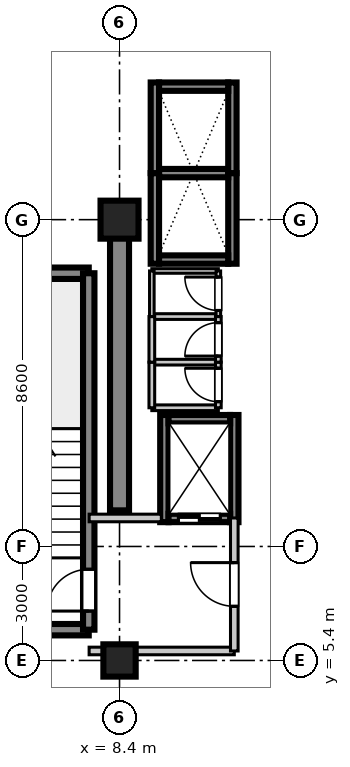
"""IFC4 building model, lengths in metres.
Left out: names, types, materials, properties, quantities, classifications, styles, units other than length and angle.
Written with IfcOpenShell. Run it as: python <this file> out.ifc"""

import sys

from ifc_helpers import new_model, si_unit, direction, frame, frame_2d, origin, origin_2d, place, context, subcontext, project, spatial, rectangle, extrude, source, transform, mapped, element, fill, save


model = new_model("IFC4")
c1 = context("Model", 3, precision=1e-05, world=origin(), true_north=direction((0.0, 1.0)))
c2 = subcontext(c1, "Body", "Model", "MODEL_VIEW")
j1 = project(units=[si_unit("LENGTHUNIT", "METRE"), si_unit("PLANEANGLEUNIT", "RADIAN")], contexts=[c1])
p1 = place(None, origin())
s1 = spatial("IfcSite", under=j1, at=p1, CompositionType="ELEMENT")
p2 = place(p1, origin())
s2 = spatial("IfcBuilding", under=s1, at=p2, CompositionType="ELEMENT")
p3 = place(p2, frame((0.0, 0.0, 234.5)))
s3 = spatial("IfcBuildingStorey", under=s2, at=p3, CompositionType="ELEMENT", Elevation=234.5)
m1 = source(origin(), c2, "Body", "SweptSolid", [
    extrude(rectangle(XDim=0.85, YDim=0.85, at=origin_2d()), origin(), (0.0, 0.0, 1.0), 3.655),
])
p4 = place(p3, frame((8.4, 5.4, 0.0), z_axis=(0.0, 0.0, 1.0), x_axis=(1.0, 0.0, 0.0)))
e1 = element("IfcColumn", 1, at=p4, inside=s3, PredefinedType="PILASTER", context=c2, shape_type="MappedRepresentation", body=[
    mapped(m1, transform((0.0, 0.0, 0.0), scale=1.0)),
])
m2 = source(origin(), c2, "Body", "SweptSolid", [
    extrude(rectangle(XDim=1.0, YDim=1.0, at=origin_2d()), origin(), (0.0, 0.0, 1.0), 3.655),
])
p5 = place(p3, frame((8.4, 17.0, 0.0), z_axis=(0.0, 0.0, 1.0), x_axis=(1.0, 0.0, 0.0)))
e2 = element("IfcColumn", 2, at=p5, inside=s3, PredefinedType="COLUMN", context=c2, shape_type="MappedRepresentation", body=[
    mapped(m2, transform((0.0, 0.0, 0.0), scale=1.0)),
])
m3 = source(origin(), c2, "Body", "SweptSolid", [
    extrude(rectangle(XDim=7.65, YDim=0.5, at=frame_2d((3.825, 0.0))), origin(), (0.0, 0.0, 1.0), 3.41),
])
p6 = place(p3, frame((8.4, 9.35, 0.0), z_axis=(0.0, 0.0, 1.0), x_axis=(0.0, 1.0, 0.0)))
e3 = element("IfcWall", 3, at=p6, inside=s3, PredefinedType="SHEAR", context=c2, shape_type="MappedRepresentation", body=[
    mapped(m3, transform((0.0, 0.0, 0.0), scale=1.0)),
])
m4 = source(origin(), c2, "Body", "SweptSolid", [
    extrude(rectangle(XDim=3.98, YDim=0.3, at=frame_2d((1.99, 0.0))), origin(), (0.0, 0.0, 1.0), 3.41),
])
for number, where, z_axis, x_axis in (
    (4, (3.61, 6.21, 0.0), (0.0, 0.0, 1.0), (1.0, 0.0, 0.0)),
    (5, (3.61, 15.59, 0.0), (0.0, 0.0, 1.0), (1.0, 0.0, 0.0)),
):
    element("IfcWall", number, at=place(p3, frame(where, z_axis=z_axis, x_axis=x_axis)), inside=s3, PredefinedType="SHEAR", context=c2, shape_type="MappedRepresentation", body=[
        mapped(m4, transform((0.0, 0.0, 0.0), scale=1.0)),
    ])
m5 = source(origin(), c2, "Body", "SweptSolid", [
    extrude(rectangle(XDim=9.38, YDim=0.3, at=frame_2d((4.69, 0.0))), origin(), (0.0, 0.0, 1.0), 3.41),
])
p7 = place(p3, frame((7.59, 6.21, 0.0), z_axis=(0.0, 0.0, 1.0), x_axis=(0.0, 1.0, 0.0)))
e6 = element("IfcWall", 6, at=p7, inside=s3, PredefinedType="SHEAR", context=c2, shape_type="MappedRepresentation", body=[
    mapped(m5, transform((0.0, 0.0, 0.0), scale=1.0)),
])
p8 = place(p7, frame((0.49, 0.0, 0.0)))
e7 = element("IfcOpeningElement", 7, at=p8, cuts=e6, PredefinedType="OPENING", context=c2, shape_type="SweptSolid", body=[
    extrude(rectangle(XDim=1.1, YDim=2.15, at=frame_2d((0.55, 1.075))), frame((0.0, 0.16, 0.0), z_axis=(0.0, -1.0, 0.0), x_axis=(1.0, 0.0, 0.0)), (0.0, 0.0, 1.0), 0.32),
])
m6 = source(origin(), c2, "Body", "SweptSolid", [
    extrude(rectangle(XDim=2.385, YDim=0.22, at=frame_2d((1.192, 0.0))), origin(), (0.0, 0.0, 1.0), 3.41),
])
for number, where, z_axis, x_axis in (
    (8, (9.33, 15.84, 0.0), (0.0, 0.0, 1.0), (0.0, 1.0, 0.0)),
    (9, (11.37, 15.84, 0.0), (0.0, 0.0, 1.0), (0.0, 1.0, 0.0)),
):
    element("IfcWall", number, at=place(p3, frame(where, z_axis=z_axis, x_axis=x_axis)), inside=s3, PredefinedType="SHEAR", context=c2, shape_type="MappedRepresentation", body=[
        mapped(m6, transform((0.0, 0.0, 0.0), scale=1.0)),
    ])
m7 = source(origin(), c2, "Body", "SweptSolid", [
    extrude(rectangle(XDim=1.82, YDim=0.22, at=frame_2d((0.91, 0.0))), origin(), (0.0, 0.0, 1.0), 3.41),
])
p9 = place(p3, frame((9.44, 15.95, 0.0), z_axis=(0.0, 0.0, 1.0), x_axis=(1.0, 0.0, 0.0)))
e10 = element("IfcWall", 10, at=p9, inside=s3, PredefinedType="SHEAR", context=c2, shape_type="MappedRepresentation", body=[
    mapped(m7, transform((0.0, 0.0, 0.0), scale=1.0)),
])
m8 = source(origin(), c2, "Body", "SweptSolid", [
    extrude(rectangle(XDim=1.82, YDim=0.22, at=frame_2d((0.91, 0.0))), origin(), (0.0, 0.0, 1.0), 3.7),
])
p10 = place(p3, frame((9.44, 18.225, 0.0), z_axis=(0.0, 0.0, 1.0), x_axis=(1.0, 0.0, 0.0)))
e11 = element("IfcWall", 11, at=p10, inside=s3, PredefinedType="SHEAR", context=c2, shape_type="MappedRepresentation", body=[
    mapped(m8, transform((0.0, 0.0, 0.0), scale=1.0)),
])
for number, where, z_axis, x_axis in (
    (12, (9.33, 18.225, 0.0), (0.0, 0.0, 1.0), (0.0, 1.0, 0.0)),
    (13, (11.37, 18.225, 0.0), (0.0, 0.0, 1.0), (0.0, 1.0, 0.0)),
):
    element("IfcWall", number, at=place(p3, frame(where, z_axis=z_axis, x_axis=x_axis)), inside=s3, PredefinedType="SHEAR", context=c2, shape_type="MappedRepresentation", body=[
        mapped(m6, transform((0.0, 0.0, 0.0), scale=1.0)),
    ])
p11 = place(p3, frame((9.44, 20.5, 0.0), z_axis=(0.0, 0.0, 1.0), x_axis=(1.0, 0.0, 0.0)))
e14 = element("IfcWall", 14, at=p11, inside=s3, PredefinedType="SHEAR", context=c2, shape_type="MappedRepresentation", body=[
    mapped(m7, transform((0.0, 0.0, 0.0), scale=1.0)),
])
m9 = source(origin(), c2, "Body", "SweptSolid", [
    extrude(rectangle(XDim=2.82, YDim=0.22, at=frame_2d((1.41, 0.0))), origin(), (0.0, 0.0, 1.0), 3.41),
])
for number, where, z_axis, x_axis in (
    (15, (9.58, 9.04, 0.0), (0.0, 0.0, 1.0), (0.0, 1.0, 0.0)),
    (16, (11.42, 9.04, 0.0), (0.0, 0.0, 1.0), (0.0, 1.0, 0.0)),
):
    element("IfcWall", number, at=place(p3, frame(where, z_axis=z_axis, x_axis=x_axis)), inside=s3, PredefinedType="SHEAR", context=c2, shape_type="MappedRepresentation", body=[
        mapped(m9, transform((0.0, 0.0, 0.0), scale=1.0)),
    ])
m10 = source(origin(), c2, "Body", "SweptSolid", [
    extrude(rectangle(XDim=1.62, YDim=0.22, at=frame_2d((0.81, 0.0))), origin(), (0.0, 0.0, 1.0), 3.41),
])
p12 = place(p3, frame((9.69, 9.15, 0.0), z_axis=(0.0, 0.0, 1.0), x_axis=(1.0, 0.0, 0.0)))
e17 = element("IfcWall", 17, at=p12, inside=s3, PredefinedType="SHEAR", context=c2, shape_type="MappedRepresentation", body=[
    mapped(m10, transform((0.0, 0.0, 0.0), scale=1.0)),
])
p13 = place(p12, frame((0.26, 0.0, 0.0)))
e18 = element("IfcOpeningElement", 18, at=p13, cuts=e17, PredefinedType="OPENING", context=c2, shape_type="SweptSolid", body=[
    extrude(rectangle(XDim=1.1, YDim=2.2, at=frame_2d((0.55, 1.1))), frame((0.0, 0.12, 0.0), z_axis=(0.0, -1.0, 0.0), x_axis=(1.0, 0.0, 0.0)), (0.0, 0.0, 1.0), 0.24),
])
p14 = place(p3, frame((9.69, 11.75, 0.0), z_axis=(0.0, 0.0, 1.0), x_axis=(1.0, 0.0, 0.0)))
e19 = element("IfcWall", 19, at=p14, inside=s3, PredefinedType="SHEAR", context=c2, shape_type="MappedRepresentation", body=[
    mapped(m10, transform((0.0, 0.0, 0.0), scale=1.0)),
])
m11 = source(origin(), c2, "Body", "SweptSolid", [
    extrude(rectangle(XDim=3.82, YDim=0.2, at=frame_2d((1.91, 0.0))), origin(), (0.0, 0.0, 1.0), 2.75),
])
p15 = place(p3, frame((7.6, 5.65, 0.0), z_axis=(0.0, 0.0, 1.0), x_axis=(1.0, 0.0, 0.0)))
e20 = element("IfcWall", 20, at=p15, inside=s3, PredefinedType="PARTITIONING", context=c2, shape_type="MappedRepresentation", body=[
    mapped(m11, transform((0.0, 0.0, 0.0), scale=1.0)),
])
m12 = source(origin(), c2, "Body", "SweptSolid", [
    extrude(rectangle(XDim=1.9, YDim=0.2, at=frame_2d((0.95, 0.0))), origin(), (0.0, 0.0, 1.0), 2.75),
])
p16 = place(p3, frame((7.6, 9.15, 0.0), z_axis=(0.0, 0.0, 1.0), x_axis=(1.0, 0.0, 0.0)))
e21 = element("IfcWall", 21, at=p16, inside=s3, PredefinedType="PARTITIONING", context=c2, shape_type="MappedRepresentation", body=[
    mapped(m12, transform((0.0, 0.0, 0.0), scale=1.0)),
])
m13 = source(origin(), c2, "Body", "SweptSolid", [
    extrude(rectangle(XDim=3.5, YDim=0.2, at=frame_2d((1.75, 0.0))), origin(), (0.0, 0.0, 1.0), 2.75),
])
p17 = place(p3, frame((11.42, 5.65, 0.0), z_axis=(0.0, 0.0, 1.0), x_axis=(0.0, 1.0, 0.0)))
e22 = element("IfcWall", 22, at=p17, inside=s3, PredefinedType="PARTITIONING", context=c2, shape_type="MappedRepresentation", body=[
    mapped(m13, transform((0.0, 0.0, 0.0), scale=1.0)),
])
p18 = place(p17, frame((1.175, 0.0, 0.0)))
e23 = element("IfcOpeningElement", 23, at=p18, cuts=e22, PredefinedType="OPENING", context=c2, shape_type="SweptSolid", body=[
    extrude(rectangle(XDim=1.15, YDim=2.15, at=frame_2d((0.575, 1.075))), frame((0.0, 0.11, 0.0), z_axis=(0.0, -1.0, 0.0), x_axis=(1.0, 0.0, 0.0)), (0.0, 0.0, 1.0), 0.22),
])
m14 = source(origin(), c2, "Body", "SweptSolid", [
    extrude(rectangle(XDim=1.75, YDim=0.15, at=frame_2d((0.875, 0.0))), origin(), (0.0, 0.0, 1.0), 2.75),
])
for number, where, z_axis, x_axis in (
    (24, (9.25, 12.05, 0.0), (0.0, 0.0, 1.0), (1.0, 0.0, 0.0)),
    (25, (9.25, 13.25, 0.0), (0.0, 0.0, 1.0), (1.0, 0.0, 0.0)),
):
    element("IfcWall", number, at=place(p3, frame(where, z_axis=z_axis, x_axis=x_axis)), inside=s3, PredefinedType="PARTITIONING", context=c2, shape_type="MappedRepresentation", body=[
        mapped(m14, transform((0.0, 0.0, 0.0), scale=1.0)),
    ])
m15 = source(origin(), c2, "Body", "SweptSolid", [
    extrude(rectangle(XDim=1.2, YDim=0.15, at=frame_2d((0.6, 0.0))), origin(), (0.0, 0.0, 1.0), 2.75),
])
p19 = place(p3, frame((9.25, 12.05, 0.0), z_axis=(0.0, 0.0, 1.0), x_axis=(0.0, 1.0, 0.0)))
e26 = element("IfcWall", 26, at=p19, inside=s3, PredefinedType="PARTITIONING", context=c2, shape_type="MappedRepresentation", body=[
    mapped(m15, transform((0.0, 0.0, 0.0), scale=1.0)),
])
p20 = place(p3, frame((11.0, 12.05, 0.0), z_axis=(0.0, 0.0, 1.0), x_axis=(0.0, 1.0, 0.0)))
e27 = element("IfcWall", 27, at=p20, inside=s3, PredefinedType="PARTITIONING", context=c2, shape_type="MappedRepresentation", body=[
    mapped(m15, transform((0.0, 0.0, 0.0), scale=1.0)),
])
p21 = place(p20, frame((0.16, 0.0, 0.0)))
e28 = element("IfcOpeningElement", 28, at=p21, cuts=e27, PredefinedType="OPENING", context=c2, shape_type="SweptSolid", body=[
    extrude(rectangle(XDim=0.88, YDim=2.1, at=frame_2d((0.44, 1.05))), frame((0.0, 0.085, 0.0), z_axis=(0.0, -1.0, 0.0), x_axis=(1.0, 0.0, 0.0)), (0.0, 0.0, 1.0), 0.17),
])
p22 = place(p3, frame((9.25, 14.45, 0.0), z_axis=(0.0, 0.0, 1.0), x_axis=(1.0, 0.0, 0.0)))
e29 = element("IfcWall", 29, at=p22, inside=s3, PredefinedType="PARTITIONING", context=c2, shape_type="MappedRepresentation", body=[
    mapped(m14, transform((0.0, 0.0, 0.0), scale=1.0)),
])
p23 = place(p3, frame((9.25, 13.25, 0.0), z_axis=(0.0, 0.0, 1.0), x_axis=(0.0, 1.0, 0.0)))
e30 = element("IfcWall", 30, at=p23, inside=s3, PredefinedType="PARTITIONING", context=c2, shape_type="MappedRepresentation", body=[
    mapped(m15, transform((0.0, 0.0, 0.0), scale=1.0)),
])
p24 = place(p3, frame((11.0, 13.25, 0.0), z_axis=(0.0, 0.0, 1.0), x_axis=(0.0, 1.0, 0.0)))
e31 = element("IfcWall", 31, at=p24, inside=s3, PredefinedType="PARTITIONING", context=c2, shape_type="MappedRepresentation", body=[
    mapped(m15, transform((0.0, 0.0, 0.0), scale=1.0)),
])
p25 = place(p24, frame((0.16, 0.0, 0.0)))
e32 = element("IfcOpeningElement", 32, at=p25, cuts=e31, PredefinedType="OPENING", context=c2, shape_type="SweptSolid", body=[
    extrude(rectangle(XDim=0.88, YDim=2.1, at=frame_2d((0.44, 1.05))), frame((0.0, 0.085, 0.0), z_axis=(0.0, -1.0, 0.0), x_axis=(1.0, 0.0, 0.0)), (0.0, 0.0, 1.0), 0.17),
])
m16 = source(origin(), c2, "Body", "SweptSolid", [
    extrude(rectangle(XDim=1.75, YDim=0.12, at=frame_2d((0.875, 0.0))), origin(), (0.0, 0.0, 1.0), 2.75),
])
p26 = place(p3, frame((9.25, 15.65, 0.0), z_axis=(0.0, 0.0, 1.0), x_axis=(1.0, 0.0, 0.0)))
e33 = element("IfcWall", 33, at=p26, inside=s3, PredefinedType="PARTITIONING", context=c2, shape_type="MappedRepresentation", body=[
    mapped(m16, transform((0.0, 0.0, 0.0), scale=1.0)),
])
m17 = source(origin(), c2, "Body", "SweptSolid", [
    extrude(rectangle(XDim=1.2, YDim=0.12, at=frame_2d((0.6, 0.0))), origin(), (0.0, 0.0, 1.0), 2.75),
])
p27 = place(p3, frame((9.25, 14.45, 0.0), z_axis=(0.0, 0.0, 1.0), x_axis=(0.0, 1.0, 0.0)))
e34 = element("IfcWall", 34, at=p27, inside=s3, PredefinedType="PARTITIONING", context=c2, shape_type="MappedRepresentation", body=[
    mapped(m17, transform((0.0, 0.0, 0.0), scale=1.0)),
])
p28 = place(p3, frame((11.0, 14.45, 0.0), z_axis=(0.0, 0.0, 1.0), x_axis=(0.0, 1.0, 0.0)))
e35 = element("IfcWall", 35, at=p28, inside=s3, PredefinedType="PARTITIONING", context=c2, shape_type="MappedRepresentation", body=[
    mapped(m17, transform((0.0, 0.0, 0.0), scale=1.0)),
])
p29 = place(p28, frame((0.16, 0.0, 0.0)))
e36 = element("IfcOpeningElement", 36, at=p29, cuts=e35, PredefinedType="OPENING", context=c2, shape_type="SweptSolid", body=[
    extrude(rectangle(XDim=0.88, YDim=2.1, at=frame_2d((0.44, 1.05))), frame((0.0, 0.07, 0.0), z_axis=(0.0, -1.0, 0.0), x_axis=(1.0, 0.0, 0.0)), (0.0, 0.0, 1.0), 0.14),
])
m18 = source(origin(), c2, "Body", "SweptSolid", [
    extrude(rectangle(XDim=1.1, YDim=2.15, at=frame_2d((0.55, 1.075))), frame((0.0, 0.025, 0.0), z_axis=(0.0, -1.0, 0.0), x_axis=(1.0, 0.0, 0.0)), (0.0, 0.0, 1.0), 0.05),
])
p30 = place(p8, origin())
e37 = element("IfcDoor", 37, at=p30, inside=s3, OperationType="SINGLE_SWING_LEFT", PredefinedType="DOOR", context=c2, shape_type="MappedRepresentation", body=[
    mapped(m18, transform((0.0, 0.0, 0.0), scale=1.0)),
])
fill(e7, e37)
m19 = source(origin(), c2, "Body", "SweptSolid", [
    extrude(rectangle(XDim=1.1, YDim=2.2, at=frame_2d((0.55, 1.1))), frame((0.0, 0.025, 0.0), z_axis=(0.0, -1.0, 0.0), x_axis=(1.0, 0.0, 0.0)), (0.0, 0.0, 1.0), 0.05),
])
p31 = place(p13, frame((1.1, 0.0, 0.0), z_axis=(0.0, 0.0, 1.0), x_axis=(-1.0, 0.0, 0.0)))
e38 = element("IfcDoor", 38, at=p31, inside=s3, OperationType="DOUBLE_DOOR_SLIDING", PredefinedType="DOOR", context=c2, shape_type="MappedRepresentation", body=[
    mapped(m19, transform((0.0, 0.0, 0.0), scale=1.0)),
])
fill(e18, e38)
m20 = source(origin(), c2, "Body", "SweptSolid", [
    extrude(rectangle(XDim=1.15, YDim=2.15, at=frame_2d((0.575, 1.075))), frame((0.0, 0.025, 0.0), z_axis=(0.0, -1.0, 0.0), x_axis=(1.0, 0.0, 0.0)), (0.0, 0.0, 1.0), 0.05),
])
p32 = place(p18, frame((1.15, 0.0, 0.0), z_axis=(0.0, 0.0, 1.0), x_axis=(-1.0, 0.0, 0.0)))
e39 = element("IfcDoor", 39, at=p32, inside=s3, OperationType="SINGLE_SWING_RIGHT", PredefinedType="DOOR", context=c2, shape_type="MappedRepresentation", body=[
    mapped(m20, transform((0.0, 0.0, 0.0), scale=1.0)),
])
fill(e23, e39)
m21 = source(origin(), c2, "Body", "SweptSolid", [
    extrude(rectangle(XDim=0.88, YDim=2.1, at=frame_2d((0.44, 1.05))), frame((0.0, 0.025, 0.0), z_axis=(0.0, -1.0, 0.0), x_axis=(1.0, 0.0, 0.0)), (0.0, 0.0, 1.0), 0.05),
])
p33 = place(p21, origin())
e40 = element("IfcDoor", 40, at=p33, inside=s3, OperationType="SINGLE_SWING_RIGHT", PredefinedType="DOOR", context=c2, shape_type="MappedRepresentation", body=[
    mapped(m21, transform((0.0, 0.0, 0.0), scale=1.0)),
])
fill(e28, e40)
p34 = place(p25, origin())
e41 = element("IfcDoor", 41, at=p34, inside=s3, OperationType="SINGLE_SWING_LEFT", PredefinedType="DOOR", context=c2, shape_type="MappedRepresentation", body=[
    mapped(m21, transform((0.0, 0.0, 0.0), scale=1.0)),
])
fill(e32, e41)
p35 = place(p29, origin())
e42 = element("IfcDoor", 42, at=p35, inside=s3, OperationType="SINGLE_SWING_RIGHT", PredefinedType="DOOR", context=c2, shape_type="MappedRepresentation", body=[
    mapped(m21, transform((0.0, 0.0, 0.0), scale=1.0)),
])
fill(e36, e42)
save(model, sys.argv[1])
